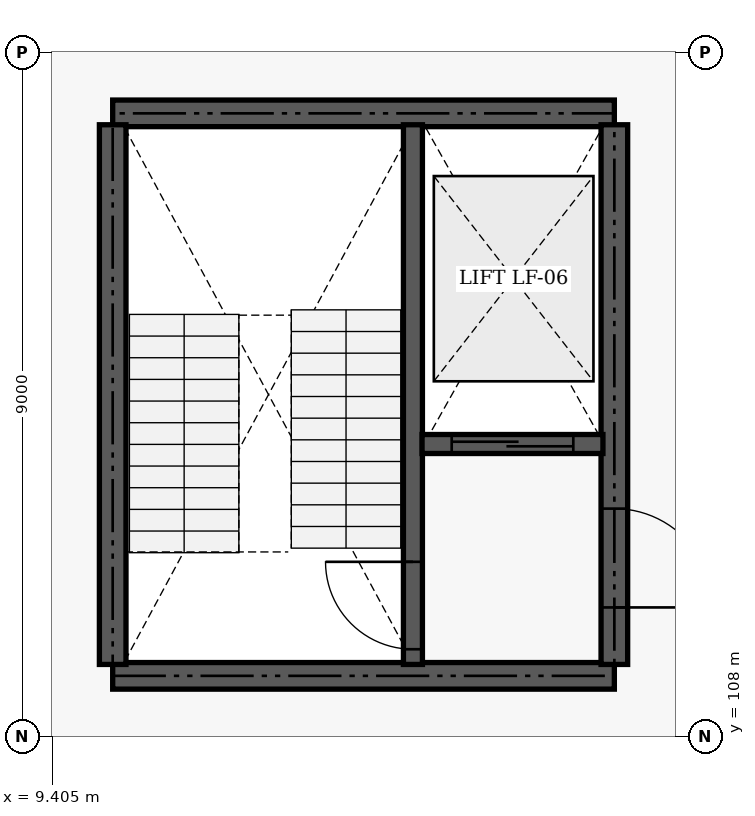
"""IFC4 building model, lengths in metres.
Left out: names, types, materials, properties, quantities, classifications, styles, units other than length and angle.
Written with IfcOpenShell. Run it as: python <this file> out.ifc"""

import sys

from ifc_helpers import new_model, si_unit, direction, frame, frame_2d, origin, place, context, subcontext, project, spatial, rectangle, extrude, element, fill, save


model = new_model("IFC4")
c1 = context("Model", 3, precision=1e-05, world=origin(), true_north=direction((0.0, 1.0)))
c2 = subcontext(c1, "Body", "Model", "MODEL_VIEW")
j1 = project(units=[si_unit("LENGTHUNIT", "METRE"), si_unit("PLANEANGLEUNIT", "RADIAN")], contexts=[c1])
p1 = place(None, origin())
s1 = spatial("IfcSite", under=j1, at=p1, CompositionType="ELEMENT")
p2 = place(p1, origin())
s2 = spatial("IfcBuilding", under=s1, at=p2, CompositionType="ELEMENT")
p3 = place(p2, frame((0.0, 0.0, 5.4)))
s3 = spatial("IfcBuildingStorey", under=s2, at=p3, CompositionType="ELEMENT", Elevation=5.4)
for number, where, z_axis, x_axis in (
    (1, (10.2, 108.8, 0.0), (0.0, 0.0, 1.0), (1.0, 0.0, 0.0)),
    (2, (10.2, 116.2, 0.0), (0.0, 0.0, 1.0), (1.0, 0.0, 0.0)),
):
    element("IfcWall", number, at=place(p3, frame(where, z_axis=z_axis, x_axis=x_axis)), inside=s3, PredefinedType="SHEAR", context=c2, shape_type="SweptSolid", body=[
        extrude(rectangle(XDim=6.6, YDim=0.35, at=frame_2d((3.3, 0.0))), origin(), (0.0, 0.0, 1.0), 4.2),
    ])
p4 = place(p3, frame((10.2, 108.95, 0.0), z_axis=(0.0, 0.0, 1.0), x_axis=(0.0, 1.0, 0.0)))
e3 = element("IfcWall", 3, at=p4, inside=s3, PredefinedType="SHEAR", context=c2, shape_type="SweptSolid", body=[
    extrude(rectangle(XDim=7.1, YDim=0.35, at=frame_2d((3.55, 0.0))), origin(), (0.0, 0.0, 1.0), 4.2),
])
p5 = place(p3, frame((16.8, 108.95, 0.0), z_axis=(0.0, 0.0, 1.0), x_axis=(0.0, 1.0, 0.0)))
e4 = element("IfcWall", 4, at=p5, inside=s3, PredefinedType="SHEAR", context=c2, shape_type="SweptSolid", body=[
    extrude(rectangle(XDim=7.1, YDim=0.35, at=frame_2d((3.55, 0.0))), origin(), (0.0, 0.0, 1.0), 4.2),
])
p6 = place(p5, frame((0.75, 0.0, 0.0)))
e5 = element("IfcOpeningElement", 5, at=p6, cuts=e4, PredefinedType="OPENING", context=c2, shape_type="SweptSolid", body=[
    extrude(rectangle(XDim=1.3, YDim=2.15, at=frame_2d((0.65, 1.075))), frame((0.0, 0.185, 0.0), z_axis=(0.0, -1.0, 0.0), x_axis=(1.0, 0.0, 0.0)), (0.0, 0.0, 1.0), 0.37),
])
p7 = place(p3, frame((14.15, 108.95, 0.0), z_axis=(0.0, 0.0, 1.0), x_axis=(0.0, 1.0, 0.0)))
e6 = element("IfcWall", 6, at=p7, inside=s3, PredefinedType="SHEAR", context=c2, shape_type="SweptSolid", body=[
    extrude(rectangle(XDim=7.1, YDim=0.25, at=frame_2d((3.55, 0.0))), origin(), (0.0, 0.0, 1.0), 4.2),
])
p8 = place(p7, frame((0.2, 0.0, 0.0)))
e7 = element("IfcOpeningElement", 7, at=p8, cuts=e6, PredefinedType="OPENING", context=c2, shape_type="SweptSolid", body=[
    extrude(rectangle(XDim=1.15, YDim=2.15, at=frame_2d((0.575, 1.075))), frame((0.0, 0.135, 0.0), z_axis=(0.0, -1.0, 0.0), x_axis=(1.0, 0.0, 0.0)), (0.0, 0.0, 1.0), 0.27),
])
p9 = place(p3, frame((14.27, 111.85, 0.0), z_axis=(0.0, 0.0, 1.0), x_axis=(1.0, 0.0, 0.0)))
e8 = element("IfcWall", 8, at=p9, inside=s3, PredefinedType="SHEAR", context=c2, shape_type="SweptSolid", body=[
    extrude(rectangle(XDim=2.38, YDim=0.25, at=frame_2d((1.19, 0.0))), origin(), (0.0, 0.0, 1.0), 4.2),
])
p10 = place(p9, frame((0.39, 0.0, 0.0)))
e9 = element("IfcOpeningElement", 9, at=p10, cuts=e8, PredefinedType="OPENING", context=c2, shape_type="SweptSolid", body=[
    extrude(rectangle(XDim=1.6, YDim=2.3, at=frame_2d((0.8, 1.15))), frame((0.0, 0.135, 0.0), z_axis=(0.0, -1.0, 0.0), x_axis=(1.0, 0.0, 0.0)), (0.0, 0.0, 1.0), 0.27),
])
p11 = place(p6, frame((1.3, 0.0, 0.0), z_axis=(0.0, 0.0, 1.0), x_axis=(-1.0, 0.0, 0.0)))
e10 = element("IfcDoor", 10, at=p11, inside=s3, OperationType="DOUBLE_DOOR_SINGLE_SWING", PredefinedType="DOOR", context=c2, shape_type="SweptSolid", body=[
    extrude(rectangle(XDim=1.3, YDim=2.15, at=frame_2d((0.65, 1.075))), frame((0.0, 0.025, 0.0), z_axis=(0.0, -1.0, 0.0), x_axis=(1.0, 0.0, 0.0)), (0.0, 0.0, 1.0), 0.05),
])
fill(e5, e10)
p12 = place(p8, frame((1.15, 0.0, 0.0), z_axis=(0.0, 0.0, 1.0), x_axis=(-1.0, 0.0, 0.0)))
e11 = element("IfcDoor", 11, at=p12, inside=s3, OperationType="SINGLE_SWING_RIGHT", PredefinedType="DOOR", context=c2, shape_type="SweptSolid", body=[
    extrude(rectangle(XDim=1.15, YDim=2.15, at=frame_2d((0.575, 1.075))), frame((0.0, 0.025, 0.0), z_axis=(0.0, -1.0, 0.0), x_axis=(1.0, 0.0, 0.0)), (0.0, 0.0, 1.0), 0.05),
])
fill(e7, e11)
p13 = place(p10, origin())
e12 = element("IfcDoor", 12, at=p13, inside=s3, OperationType="SLIDING_TO_LEFT", PredefinedType="DOOR", context=c2, shape_type="SweptSolid", body=[
    extrude(rectangle(XDim=1.6, YDim=2.3, at=frame_2d((0.8, 1.15))), frame((0.0, 0.025, 0.0), z_axis=(0.0, -1.0, 0.0), x_axis=(1.0, 0.0, 0.0)), (0.0, 0.0, 1.0), 0.05),
])
fill(e9, e12)
save(model, sys.argv[1])
